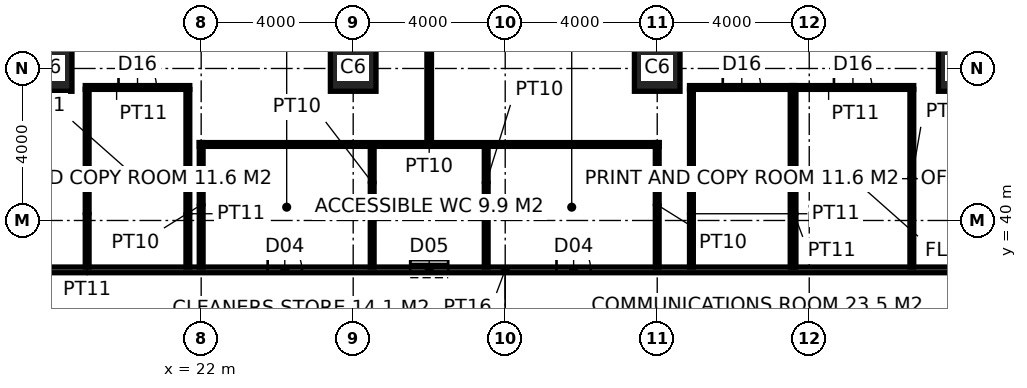
"""IFC4 building model, lengths in metres.
Left out: names, types, materials, properties, quantities, classifications, styles, units other than length and angle.
Written with IfcOpenShell. Run it as: python <this file> out.ifc"""

import sys

from ifc_helpers import new_model, si_unit, direction, frame, frame_2d, origin, origin_2d, place, context, subcontext, project, spatial, rectangle, hollow_rectangle, extrude, element, fill, save


model = new_model("IFC4")
c1 = context("Model", 3, precision=1e-05, world=origin(), true_north=direction((0.0, 1.0)))
c2 = subcontext(c1, "Body", "Model", "MODEL_VIEW")
j1 = project(units=[si_unit("LENGTHUNIT", "METRE"), si_unit("PLANEANGLEUNIT", "RADIAN")], contexts=[c1])
p1 = place(None, origin())
s1 = spatial("IfcSite", under=j1, at=p1, CompositionType="ELEMENT")
p2 = place(p1, origin())
s2 = spatial("IfcBuilding", under=s1, at=p2, CompositionType="ELEMENT")
p3 = place(p2, frame((0.0, 0.0, 67.0)))
s3 = spatial("IfcBuildingStorey", under=s2, at=p3, CompositionType="ELEMENT", Elevation=67.0)
for number, where, z_axis, x_axis in (
    (1, (18.0, 44.0, 0.0), (0.0, 0.0, 1.0), (1.0, 0.0, 0.0)),
    (2, (26.0, 44.0, 0.0), (0.0, 0.0, 1.0), (1.0, 0.0, 0.0)),
    (3, (34.0, 44.0, 0.0), (0.0, 0.0, 1.0), (1.0, 0.0, 0.0)),
    (4, (42.0, 44.0, 0.0), (0.0, 0.0, 1.0), (1.0, 0.0, 0.0)),
):
    element("IfcColumn", number, at=place(p3, frame(where, z_axis=z_axis, x_axis=x_axis)), inside=s3, PredefinedType="COLUMN", context=c2, shape_type="SweptSolid", body=[
        extrude(hollow_rectangle(XDim=1.2, YDim=1.2, WallThickness=0.125, at=origin_2d()), origin(), (0.0, 0.0, 1.0), 4.0),
    ])
p4 = place(p3, frame((15.775, 38.7, 0.0), z_axis=(0.0, 0.0, 1.0), x_axis=(1.0, 0.0, 0.0)))
e5 = element("IfcWall", 5, at=p4, inside=s3, PredefinedType="PARTITIONING", context=c2, shape_type="SweptSolid", body=[
    extrude(rectangle(XDim=28.45, YDim=0.15, at=frame_2d((14.225, 0.0))), origin(), (0.0, 0.0, 1.0), 3.85),
])
p5 = place(p4, frame((7.975, 0.0, 0.0)))
e6 = element("IfcOpeningElement", 6, at=p5, cuts=e5, PredefinedType="OPENING", context=c2, shape_type="SweptSolid", body=[
    extrude(rectangle(XDim=0.9, YDim=2.1, at=frame_2d((0.45, 1.05))), frame((0.0, 0.085, 0.0), z_axis=(0.0, -1.0, 0.0), x_axis=(1.0, 0.0, 0.0)), (0.0, 0.0, 1.0), 0.17),
])
p6 = place(p4, frame((11.725, 0.0, 0.0)))
e7 = element("IfcOpeningElement", 7, at=p6, cuts=e5, PredefinedType="OPENING", context=c2, shape_type="SweptSolid", body=[
    extrude(rectangle(XDim=1.0, YDim=2.1, at=frame_2d((0.5, 1.05))), frame((0.0, 0.085, 0.0), z_axis=(0.0, -1.0, 0.0), x_axis=(1.0, 0.0, 0.0)), (0.0, 0.0, 1.0), 0.17),
])
p7 = place(p4, frame((15.575, 0.0, 0.0)))
e8 = element("IfcOpeningElement", 8, at=p7, cuts=e5, PredefinedType="OPENING", context=c2, shape_type="SweptSolid", body=[
    extrude(rectangle(XDim=0.9, YDim=2.1, at=frame_2d((0.45, 1.05))), frame((0.0, 0.085, 0.0), z_axis=(0.0, -1.0, 0.0), x_axis=(1.0, 0.0, 0.0)), (0.0, 0.0, 1.0), 0.17),
])
p8 = place(p3, frame((22.0, 38.775, 0.0), z_axis=(0.0, 0.0, 1.0), x_axis=(0.0, 1.0, 0.0)))
e9 = element("IfcWall", 9, at=p8, inside=s3, PredefinedType="PARTITIONING", context=c2, shape_type="SweptSolid", body=[
    extrude(rectangle(XDim=3.275, YDim=0.1, at=frame_2d((1.638, 0.0))), origin(), (0.0, 0.0, 1.0), 2.95),
])
p9 = place(p3, frame((34.0, 38.775, 0.0), z_axis=(0.0, 0.0, 1.0), x_axis=(0.0, 1.0, 0.0)))
e10 = element("IfcWall", 10, at=p9, inside=s3, PredefinedType="PARTITIONING", context=c2, shape_type="SweptSolid", body=[
    extrude(rectangle(XDim=3.275, YDim=0.1, at=frame_2d((1.638, 0.0))), origin(), (0.0, 0.0, 1.0), 2.85),
])
p10 = place(p3, frame((21.95, 42.0, 0.0), z_axis=(0.0, 0.0, 1.0), x_axis=(1.0, 0.0, 0.0)))
e11 = element("IfcWall", 11, at=p10, inside=s3, PredefinedType="PARTITIONING", context=c2, shape_type="SweptSolid", body=[
    extrude(rectangle(XDim=12.1, YDim=0.1, at=frame_2d((6.05, 0.0))), origin(), (0.0, 0.0, 1.0), 3.85),
])
for number, where, z_axis, x_axis in (
    (12, (26.5, 38.775, 0.0), (0.0, 0.0, 1.0), (0.0, 1.0, 0.0)),
    (13, (29.5, 38.775, 0.0), (0.0, 0.0, 1.0), (0.0, 1.0, 0.0)),
):
    element("IfcWall", number, at=place(p3, frame(where, z_axis=z_axis, x_axis=x_axis)), inside=s3, PredefinedType="PARTITIONING", context=c2, shape_type="SweptSolid", body=[
        extrude(rectangle(XDim=3.175, YDim=0.1, at=frame_2d((1.587, 0.0))), origin(), (0.0, 0.0, 1.0), 2.65),
    ])
p11 = place(p3, frame((28.0, 42.05, 0.0), z_axis=(0.0, 0.0, 1.0), x_axis=(0.0, 1.0, 0.0)))
e14 = element("IfcWall", 14, at=p11, inside=s3, PredefinedType="PARTITIONING", context=c2, shape_type="SweptSolid", body=[
    extrude(rectangle(XDim=5.65, YDim=0.12, at=frame_2d((2.825, 0.0))), origin(), (0.0, 0.0, 1.0), 3.85),
])
p12 = place(p3, frame((18.95, 43.5, 0.0), z_axis=(0.0, 0.0, 1.0), x_axis=(1.0, 0.0, 0.0)))
e15 = element("IfcWall", 15, at=p12, inside=s3, PredefinedType="PARTITIONING", context=c2, shape_type="SweptSolid", body=[
    extrude(rectangle(XDim=2.75, YDim=0.1, at=frame_2d((1.375, 0.0))), origin(), (0.0, 0.0, 1.0), 3.85),
])
p13 = place(p12, frame((0.875, 0.0, 0.0)))
e16 = element("IfcOpeningElement", 16, at=p13, cuts=e15, PredefinedType="OPENING", context=c2, shape_type="SweptSolid", body=[
    extrude(rectangle(XDim=1.0, YDim=2.2, at=frame_2d((0.5, 1.1))), frame((0.0, 0.06, 0.0), z_axis=(0.0, -1.0, 0.0), x_axis=(1.0, 0.0, 0.0)), (0.0, 0.0, 1.0), 0.12),
])
p14 = place(p3, frame((34.85, 43.5, 0.0), z_axis=(0.0, 0.0, 1.0), x_axis=(1.0, 0.0, 0.0)))
e17 = element("IfcWall", 17, at=p14, inside=s3, PredefinedType="PARTITIONING", context=c2, shape_type="SweptSolid", body=[
    extrude(rectangle(XDim=2.75, YDim=0.1, at=frame_2d((1.375, 0.0))), origin(), (0.0, 0.0, 1.0), 3.85),
])
p15 = place(p14, frame((0.875, 0.0, 0.0)))
e18 = element("IfcOpeningElement", 18, at=p15, cuts=e17, PredefinedType="OPENING", context=c2, shape_type="SweptSolid", body=[
    extrude(rectangle(XDim=1.0, YDim=2.2, at=frame_2d((0.5, 1.1))), frame((0.0, 0.06, 0.0), z_axis=(0.0, -1.0, 0.0), x_axis=(1.0, 0.0, 0.0)), (0.0, 0.0, 1.0), 0.12),
])
p16 = place(p3, frame((37.55, 43.5, 0.0), z_axis=(0.0, 0.0, 1.0), x_axis=(1.0, 0.0, 0.0)))
e19 = element("IfcWall", 19, at=p16, inside=s3, PredefinedType="PARTITIONING", context=c2, shape_type="SweptSolid", body=[
    extrude(rectangle(XDim=3.2, YDim=0.1, at=frame_2d((1.6, 0.0))), origin(), (0.0, 0.0, 1.0), 3.85),
])
p17 = place(p16, frame((1.1, 0.0, 0.0)))
e20 = element("IfcOpeningElement", 20, at=p17, cuts=e19, PredefinedType="OPENING", context=c2, shape_type="SweptSolid", body=[
    extrude(rectangle(XDim=1.0, YDim=2.2, at=frame_2d((0.5, 1.1))), frame((0.0, 0.06, 0.0), z_axis=(0.0, -1.0, 0.0), x_axis=(1.0, 0.0, 0.0)), (0.0, 0.0, 1.0), 0.12),
])
for number, where, z_axis, x_axis in (
    (21, (19.0, 38.775, 0.0), (0.0, 0.0, 1.0), (0.0, 1.0, 0.0)),
    (22, (21.65, 38.775, 0.0), (0.0, 0.0, 1.0), (0.0, 1.0, 0.0)),
    (23, (34.9, 38.775, 0.0), (0.0, 0.0, 1.0), (0.0, 1.0, 0.0)),
    (24, (37.55, 38.775, 0.0), (0.0, 0.0, 1.0), (0.0, 1.0, 0.0)),
    (25, (37.6, 38.775, 0.0), (0.0, 0.0, 1.0), (0.0, 1.0, 0.0)),
    (26, (40.7, 38.775, 0.0), (0.0, 0.0, 1.0), (0.0, 1.0, 0.0)),
):
    element("IfcWall", number, at=place(p3, frame(where, z_axis=z_axis, x_axis=x_axis)), inside=s3, PredefinedType="PARTITIONING", context=c2, shape_type="SweptSolid", body=[
        extrude(rectangle(XDim=4.675, YDim=0.1, at=frame_2d((2.337, 0.0))), origin(), (0.0, 0.0, 1.0), 3.85),
    ])
p18 = place(p5, origin())
e27 = element("IfcDoor", 27, at=p18, inside=s3, OperationType="SINGLE_SWING_LEFT", PredefinedType="DOOR", context=c2, shape_type="SweptSolid", body=[
    extrude(rectangle(XDim=0.9, YDim=2.1, at=frame_2d((0.45, 1.05))), frame((0.0, 0.025, 0.0), z_axis=(0.0, -1.0, 0.0), x_axis=(1.0, 0.0, 0.0)), (0.0, 0.0, 1.0), 0.05),
])
fill(e6, e27)
p19 = place(p6, origin())
e28 = element("IfcDoor", 28, at=p19, inside=s3, OperationType="SLIDING_TO_LEFT", PredefinedType="DOOR", context=c2, shape_type="SweptSolid", body=[
    extrude(rectangle(XDim=1.0, YDim=2.1, at=frame_2d((0.5, 1.05))), frame((0.0, 0.025, 0.0), z_axis=(0.0, -1.0, 0.0), x_axis=(1.0, 0.0, 0.0)), (0.0, 0.0, 1.0), 0.05),
])
fill(e7, e28)
p20 = place(p7, origin())
e29 = element("IfcDoor", 29, at=p20, inside=s3, OperationType="SINGLE_SWING_LEFT", PredefinedType="DOOR", context=c2, shape_type="SweptSolid", body=[
    extrude(rectangle(XDim=0.9, YDim=2.1, at=frame_2d((0.45, 1.05))), frame((0.0, 0.025, 0.0), z_axis=(0.0, -1.0, 0.0), x_axis=(1.0, 0.0, 0.0)), (0.0, 0.0, 1.0), 0.05),
])
fill(e8, e29)
p21 = place(p13, origin())
e30 = element("IfcDoor", 30, at=p21, inside=s3, OperationType="SINGLE_SWING_LEFT", PredefinedType="DOOR", context=c2, shape_type="SweptSolid", body=[
    extrude(rectangle(XDim=1.0, YDim=2.2, at=frame_2d((0.5, 1.1))), frame((0.0, 0.025, 0.0), z_axis=(0.0, -1.0, 0.0), x_axis=(1.0, 0.0, 0.0)), (0.0, 0.0, 1.0), 0.05),
])
fill(e16, e30)
p22 = place(p15, origin())
e31 = element("IfcDoor", 31, at=p22, inside=s3, OperationType="SINGLE_SWING_LEFT", PredefinedType="DOOR", context=c2, shape_type="SweptSolid", body=[
    extrude(rectangle(XDim=1.0, YDim=2.2, at=frame_2d((0.5, 1.1))), frame((0.0, 0.025, 0.0), z_axis=(0.0, -1.0, 0.0), x_axis=(1.0, 0.0, 0.0)), (0.0, 0.0, 1.0), 0.05),
])
fill(e18, e31)
p23 = place(p17, origin())
e32 = element("IfcDoor", 32, at=p23, inside=s3, OperationType="SINGLE_SWING_LEFT", PredefinedType="DOOR", context=c2, shape_type="SweptSolid", body=[
    extrude(rectangle(XDim=1.0, YDim=2.2, at=frame_2d((0.5, 1.1))), frame((0.0, 0.025, 0.0), z_axis=(0.0, -1.0, 0.0), x_axis=(1.0, 0.0, 0.0)), (0.0, 0.0, 1.0), 0.05),
])
fill(e20, e32)
save(model, sys.argv[1])
